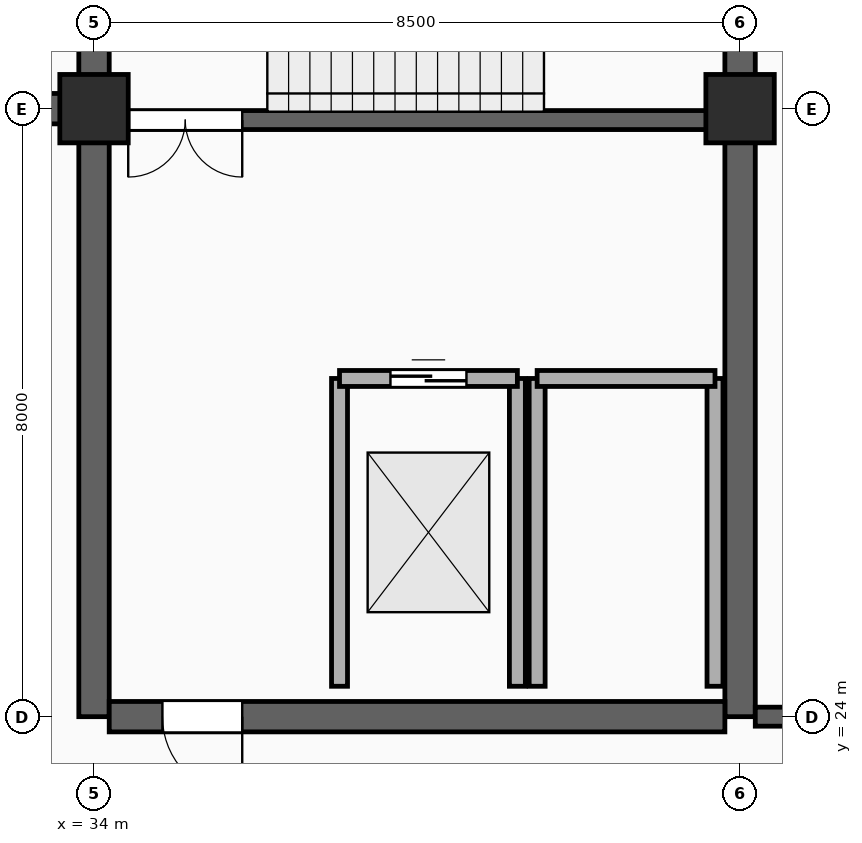
"""IFC4 building model, lengths in metres.
Left out: names, types, materials, properties, quantities, classifications, styles, units other than length and angle.
Written with IfcOpenShell. Run it as: python <this file> out.ifc"""

import sys

from ifc_helpers import new_model, si_unit, direction, frame, frame_2d, origin, origin_2d, place, context, subcontext, project, spatial, rectangle, extrude, element, fill, save


model = new_model("IFC4")
c1 = context("Model", 3, precision=1e-05, world=origin(), true_north=direction((0.0, 1.0)))
c2 = subcontext(c1, "Body", "Model", "MODEL_VIEW")
j1 = project(units=[si_unit("LENGTHUNIT", "METRE"), si_unit("PLANEANGLEUNIT", "RADIAN")], contexts=[c1])
p1 = place(None, origin())
s1 = spatial("IfcSite", under=j1, at=p1, CompositionType="ELEMENT")
p2 = place(p1, origin())
s2 = spatial("IfcBuilding", under=s1, at=p2, CompositionType="ELEMENT")
p3 = place(p2, frame((0.0, 0.0, -4.8)))
s3 = spatial("IfcBuildingStorey", under=s2, at=p3, CompositionType="ELEMENT", Elevation=-4.8)
p4 = place(p3, frame((34.0, 32.0, 0.0), z_axis=(0.0, 0.0, 1.0), x_axis=(0.0, 1.0, 0.0)))
e1 = element("IfcWall", 1, at=p4, inside=s3, PredefinedType="SHEAR", context=c2, shape_type="SweptSolid", body=[
    extrude(rectangle(XDim=12.8, YDim=0.4, at=frame_2d((6.4, 0.0))), origin(), (0.0, 0.0, 1.0), 4.64),
])
p5 = place(p3, frame((25.7, 32.0, 0.0), z_axis=(0.0, 0.0, 1.0), x_axis=(1.0, 0.0, 0.0)))
e2 = element("IfcWall", 2, at=p5, inside=s3, PredefinedType="SHEAR", context=c2, shape_type="SweptSolid", body=[
    extrude(rectangle(XDim=8.1, YDim=0.4, at=frame_2d((4.05, 0.0))), origin(), (0.0, 0.0, 1.0), 4.64),
])
p6 = place(p3, frame((34.0, 24.0, 0.0), z_axis=(0.0, 0.0, 1.0), x_axis=(0.0, 1.0, 0.0)))
e3 = element("IfcWall", 3, at=p6, inside=s3, PredefinedType="SHEAR", context=c2, shape_type="SweptSolid", body=[
    extrude(rectangle(XDim=7.8, YDim=0.4, at=frame_2d((3.9, 0.0))), origin(), (0.0, 0.0, 1.0), 4.64),
])
p7 = place(p3, frame((42.5, 24.0, 0.0), z_axis=(0.0, 0.0, 1.0), x_axis=(0.0, 1.0, 0.0)))
e4 = element("IfcWall", 4, at=p7, inside=s3, PredefinedType="SHEAR", context=c2, shape_type="SweptSolid", body=[
    extrude(rectangle(XDim=12.8, YDim=0.4, at=frame_2d((6.4, 0.0))), origin(), (0.0, 0.0, 1.0), 4.64),
])
p8 = place(p3, frame((34.2, 24.0, 0.0), z_axis=(0.0, 0.0, 1.0), x_axis=(1.0, 0.0, 0.0)))
e5 = element("IfcWall", 5, at=p8, inside=s3, PredefinedType="SHEAR", context=c2, shape_type="SweptSolid", body=[
    extrude(rectangle(XDim=8.1, YDim=0.4, at=frame_2d((4.05, 0.0))), origin(), (0.0, 0.0, 1.0), 4.64),
])
p9 = place(p8, frame((0.7, 0.0, 0.0)))
e6 = element("IfcOpeningElement", 6, at=p9, cuts=e5, PredefinedType="OPENING", context=c2, shape_type="SweptSolid", body=[
    extrude(rectangle(XDim=1.05, YDim=2.15, at=frame_2d((0.525, 1.075))), frame((0.0, 0.212, 0.0), z_axis=(0.0, -1.0, 0.0), x_axis=(1.0, 0.0, 0.0)), (0.0, 0.0, 1.0), 0.424),
])
p10 = place(p3, frame((34.25, 31.85, 0.0), z_axis=(0.0, 0.0, 1.0), x_axis=(1.0, 0.0, 0.0)))
e7 = element("IfcWall", 7, at=p10, inside=s3, PredefinedType="STANDARD", context=c2, shape_type="SweptSolid", body=[
    extrude(rectangle(XDim=8.0, YDim=0.25, at=frame_2d((4.0, 0.0))), origin(), (0.0, 0.0, 1.0), 4.64),
])
p11 = place(p10, frame((0.2, 0.0, 0.0)))
e8 = element("IfcOpeningElement", 8, at=p11, cuts=e7, PredefinedType="OPENING", context=c2, shape_type="SweptSolid", body=[
    extrude(rectangle(XDim=1.5, YDim=2.2, at=frame_2d((0.75, 1.1))), frame((0.0, 0.137, 0.0), z_axis=(0.0, -1.0, 0.0), x_axis=(1.0, 0.0, 0.0)), (0.0, 0.0, 1.0), 0.274),
])
for number, where, z_axis, x_axis in (
    (9, (37.23, 24.4, 0.0), (0.0, 0.0, 1.0), (0.0, 1.0, 0.0)),
    (10, (39.57, 24.4, 0.0), (0.0, 0.0, 1.0), (0.0, 1.0, 0.0)),
):
    element("IfcWall", number, at=place(p3, frame(where, z_axis=z_axis, x_axis=x_axis)), inside=s3, PredefinedType="PARTITIONING", context=c2, shape_type="SweptSolid", body=[
        extrude(rectangle(XDim=4.05, YDim=0.21, at=frame_2d((2.025, 0.0))), origin(), (0.0, 0.0, 1.0), 4.64),
    ])
p12 = place(p3, frame((37.23, 28.45, 0.0), z_axis=(0.0, 0.0, 1.0), x_axis=(1.0, 0.0, 0.0)))
e11 = element("IfcWall", 11, at=p12, inside=s3, PredefinedType="PARTITIONING", context=c2, shape_type="SweptSolid", body=[
    extrude(rectangle(XDim=2.34, YDim=0.21, at=frame_2d((1.17, 0.0))), origin(), (0.0, 0.0, 1.0), 4.64),
])
p13 = place(p12, frame((0.67, 0.0, 0.0)))
e12 = element("IfcOpeningElement", 12, at=p13, cuts=e11, PredefinedType="OPENING", context=c2, shape_type="SweptSolid", body=[
    extrude(rectangle(XDim=1.0, YDim=2.2, at=frame_2d((0.5, 1.1))), frame((0.0, 0.117, 0.0), z_axis=(0.0, -1.0, 0.0), x_axis=(1.0, 0.0, 0.0)), (0.0, 0.0, 1.0), 0.234),
])
for number, where, z_axis, x_axis in (
    (13, (39.83, 24.4, 0.0), (0.0, 0.0, 1.0), (0.0, 1.0, 0.0)),
    (14, (42.17, 24.4, 0.0), (0.0, 0.0, 1.0), (0.0, 1.0, 0.0)),
):
    element("IfcWall", number, at=place(p3, frame(where, z_axis=z_axis, x_axis=x_axis)), inside=s3, PredefinedType="PARTITIONING", context=c2, shape_type="SweptSolid", body=[
        extrude(rectangle(XDim=4.05, YDim=0.21, at=frame_2d((2.025, 0.0))), origin(), (0.0, 0.0, 1.0), 4.64),
    ])
p14 = place(p3, frame((39.83, 28.45, 0.0), z_axis=(0.0, 0.0, 1.0), x_axis=(1.0, 0.0, 0.0)))
e15 = element("IfcWall", 15, at=p14, inside=s3, PredefinedType="PARTITIONING", context=c2, shape_type="SweptSolid", body=[
    extrude(rectangle(XDim=2.34, YDim=0.21, at=frame_2d((1.17, 0.0))), origin(), (0.0, 0.0, 1.0), 4.64),
])
for number, where, z_axis, x_axis in (
    (16, (34.0, 32.0, 0.0), (0.0, 0.0, 1.0), (1.0, 0.0, 0.0)),
    (17, (42.5, 32.0, 0.0), (0.0, 0.0, 1.0), (1.0, 0.0, 0.0)),
):
    element("IfcColumn", number, at=place(p3, frame(where, z_axis=z_axis, x_axis=x_axis)), inside=s3, PredefinedType="COLUMN", context=c2, shape_type="SweptSolid", body=[
        extrude(rectangle(XDim=0.9, YDim=0.9, at=origin_2d()), origin(), (0.0, 0.0, 1.0), 4.46),
    ])
p15 = place(p3, frame((42.7, 24.0, 0.0), z_axis=(0.0, 0.0, 1.0), x_axis=(1.0, 0.0, 0.0)))
e18 = element("IfcWall", 18, at=p15, inside=s3, PredefinedType="STANDARD", context=c2, shape_type="SweptSolid", body=[
    extrude(rectangle(XDim=25.1, YDim=0.25, at=frame_2d((12.55, 0.0))), origin(), (0.0, 0.0, 1.0), 4.5),
])
p16 = place(p15, frame((5.5, 0.0, 0.0)))
e19 = element("IfcOpeningElement", 19, at=p16, cuts=e18, PredefinedType="OPENING", context=c2, shape_type="SweptSolid", body=[
    extrude(rectangle(XDim=1.4, YDim=2.3, at=frame_2d((0.7, 1.15))), frame((0.0, 0.137, 0.0), z_axis=(0.0, -1.0, 0.0), x_axis=(1.0, 0.0, 0.0)), (0.0, 0.0, 1.0), 0.274),
])
p17 = place(p11, frame((1.5, 0.0, 0.0), z_axis=(0.0, 0.0, 1.0), x_axis=(-1.0, 0.0, 0.0)))
e20 = element("IfcDoor", 20, at=p17, inside=s3, OperationType="DOUBLE_DOOR_SINGLE_SWING", PredefinedType="DOOR", context=c2, shape_type="SweptSolid", body=[
    extrude(rectangle(XDim=1.5, YDim=2.2, at=frame_2d((0.75, 1.1))), frame((0.0, 0.025, 0.0), z_axis=(0.0, -1.0, 0.0), x_axis=(1.0, 0.0, 0.0)), (0.0, 0.0, 1.0), 0.05),
])
fill(e8, e20)
p18 = place(p13, origin())
e21 = element("IfcDoor", 21, at=p18, inside=s3, OperationType="DOUBLE_DOOR_SLIDING", PredefinedType="DOOR", context=c2, shape_type="SweptSolid", body=[
    extrude(rectangle(XDim=1.0, YDim=2.2, at=frame_2d((0.5, 1.1))), frame((0.0, 0.025, 0.0), z_axis=(0.0, -1.0, 0.0), x_axis=(1.0, 0.0, 0.0)), (0.0, 0.0, 1.0), 0.05),
])
fill(e12, e21)
p19 = place(p9, frame((1.05, 0.0, 0.0), z_axis=(0.0, 0.0, 1.0), x_axis=(-1.0, 0.0, 0.0)))
e22 = element("IfcDoor", 22, at=p19, inside=s3, OperationType="SINGLE_SWING_RIGHT", PredefinedType="DOOR", context=c2, shape_type="SweptSolid", body=[
    extrude(rectangle(XDim=1.05, YDim=2.15, at=frame_2d((0.525, 1.075))), frame((0.0, 0.025, 0.0), z_axis=(0.0, -1.0, 0.0), x_axis=(1.0, 0.0, 0.0)), (0.0, 0.0, 1.0), 0.05),
])
fill(e6, e22)
save(model, sys.argv[1])
